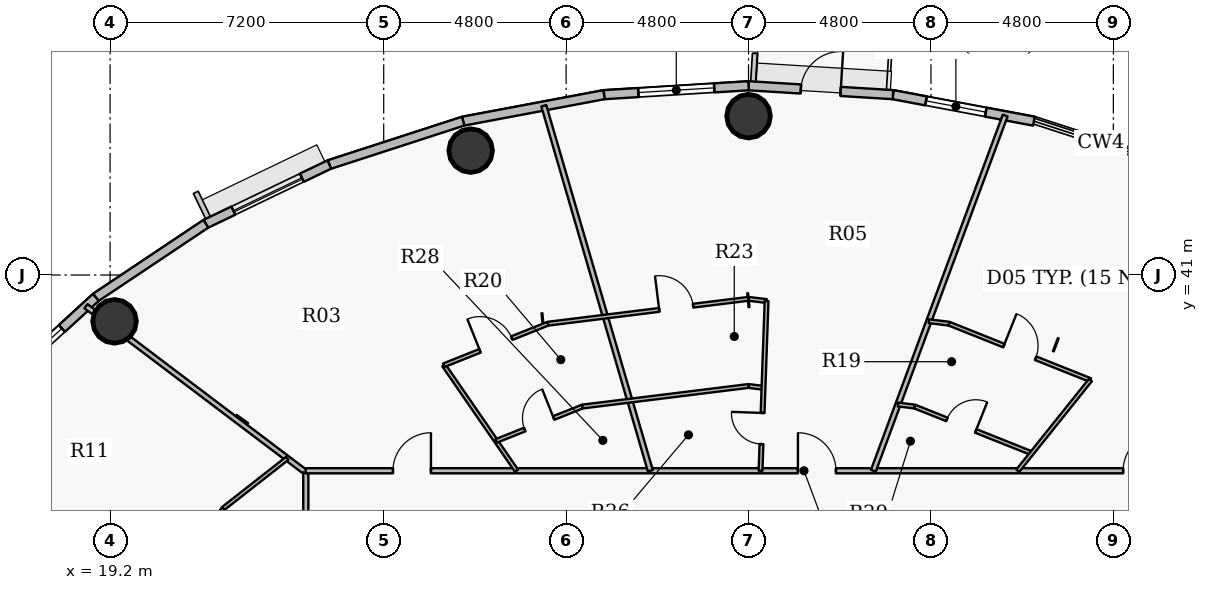
"""IFC4 building model, lengths in metres.
Left out: names, types, materials, properties, quantities, classifications, styles, units other than length and angle.
Written with IfcOpenShell. Run it as: python <this file> out.ifc"""

import sys

from ifc_helpers import new_model, si_unit, direction, frame, frame_2d, origin, origin_2d, place, context, subcontext, project, spatial, rectangle, hollow_circle, extrude, source, transform, mapped, element, fill, save


model = new_model("IFC4")
c1 = context("Model", 3, precision=1e-05, world=origin(), true_north=direction((0.0, 1.0)))
c2 = subcontext(c1, "Body", "Model", "MODEL_VIEW")
j1 = project(units=[si_unit("LENGTHUNIT", "METRE"), si_unit("PLANEANGLEUNIT", "RADIAN")], contexts=[c1])
p1 = place(None, origin())
s1 = spatial("IfcSite", under=j1, at=p1, CompositionType="ELEMENT")
p2 = place(p1, origin())
s2 = spatial("IfcBuilding", under=s1, at=p2, CompositionType="ELEMENT")
p3 = place(p2, frame((0.0, 0.0, 214.05)))
s3 = spatial("IfcBuildingStorey", under=s2, at=p3, CompositionType="ELEMENT", Elevation=214.05)
for number, where, z_axis, x_axis in (
    (1, (36.0, 45.18, 0.0), (0.0, 0.0, 1.0), (1.0, 0.0, 0.0)),
    (2, (28.688, 44.273, 0.0), (0.0, 0.0, 1.0), (1.0, 0.0, 0.0)),
    (3, (19.317, 39.781, 0.0), (0.0, 0.0, 1.0), (1.0, 0.0, 0.0)),
):
    element("IfcColumn", number, at=place(p3, frame(where, z_axis=z_axis, x_axis=x_axis)), inside=s3, PredefinedType="COLUMN", context=c2, shape_type="SweptSolid", body=[
        extrude(hollow_circle(Radius=0.575, WallThickness=0.036, at=origin_2d()), origin(), (0.0, 0.0, 1.0), 3.75),
    ])
p4 = place(p3, frame((39.802, 45.746, 0.0), z_axis=(0.0, 0.0, 1.0), x_axis=(0.982784898575, -0.184753465822, 0.0)))
e4 = element("IfcWall", 4, at=p4, inside=s3, PredefinedType="SOLIDWALL", context=c2, shape_type="SweptSolid", body=[
    extrude(rectangle(XDim=3.773, YDim=0.24, at=frame_2d((1.886, 0.0))), origin(), (0.0, 0.0, 1.0), 3.5),
])
p5 = place(p4, frame((0.884, 0.0, 0.9)))
e5 = element("IfcOpeningElement", 5, at=p5, cuts=e4, PredefinedType="OPENING", context=c2, shape_type="SweptSolid", body=[
    extrude(rectangle(XDim=1.6, YDim=1.75, at=origin_2d()), frame((0.8, 0.13, 0.875), z_axis=(0.0, -1.0, 0.0), x_axis=(1.0, 0.0, 0.0)), (0.0, 0.0, 1.0), 0.26),
])
p6 = place(p3, frame((36.0, 45.98, 0.0), z_axis=(0.0, 0.0, 1.0), x_axis=(0.998108785312, -0.06147237333, 0.0)))
e6 = element("IfcWall", 6, at=p6, inside=s3, PredefinedType="SOLIDWALL", context=c2, shape_type="SweptSolid", body=[
    extrude(rectangle(XDim=3.809, YDim=0.24, at=frame_2d((1.904, 0.0))), origin(), (0.0, 0.0, 1.0), 3.5),
])
p7 = place(p6, frame((1.379, 0.0, 0.0)))
e7 = element("IfcOpeningElement", 7, at=p7, cuts=e6, PredefinedType="OPENING", context=c2, shape_type="SweptSolid", body=[
    extrude(rectangle(XDim=1.05, YDim=2.15, at=origin_2d()), frame((0.525, 0.13, 1.075), z_axis=(0.0, -1.0, 0.0), x_axis=(1.0, 0.0, 0.0)), (0.0, 0.0, 1.0), 0.26),
])
p8 = place(p3, frame((32.198, 45.746, 0.0), z_axis=(0.0, 0.0, 1.0), x_axis=(0.998108785312, 0.06147237333, 0.0)))
e8 = element("IfcWall", 8, at=p8, inside=s3, PredefinedType="SOLIDWALL", context=c2, shape_type="SweptSolid", body=[
    extrude(rectangle(XDim=3.809, YDim=0.24, at=frame_2d((1.904, 0.0))), origin(), (0.0, 0.0, 1.0), 3.5),
])
p9 = place(p8, frame((0.905, 0.0, 0.9)))
e9 = element("IfcOpeningElement", 9, at=p9, cuts=e8, PredefinedType="OPENING", context=c2, shape_type="SweptSolid", body=[
    extrude(rectangle(XDim=2.0, YDim=1.75, at=origin_2d()), frame((1.0, 0.13, 0.875), z_axis=(0.0, -1.0, 0.0), x_axis=(1.0, 0.0, 0.0)), (0.0, 0.0, 1.0), 0.26),
])
p10 = place(p3, frame((28.491, 45.049, 0.0), z_axis=(0.0, 0.0, 1.0), x_axis=(0.982784898575, 0.184753465822, 0.0)))
e10 = element("IfcWall", 10, at=p10, inside=s3, PredefinedType="SOLIDWALL", context=c2, shape_type="SweptSolid", body=[
    extrude(rectangle(XDim=3.773, YDim=0.24, at=frame_2d((1.886, 0.0))), origin(), (0.0, 0.0, 1.0), 3.5),
])
p11 = place(p3, frame((24.969, 43.906, 0.0), z_axis=(0.0, 0.0, 1.0), x_axis=(0.951210789182, 0.308541787354, 0.0)))
e11 = element("IfcWall", 11, at=p11, inside=s3, PredefinedType="SOLIDWALL", context=c2, shape_type="SweptSolid", body=[
    extrude(rectangle(XDim=3.702, YDim=0.24, at=frame_2d((1.851, 0.0))), origin(), (0.0, 0.0, 1.0), 3.5),
])
p12 = place(p3, frame((21.72, 42.348, 0.0), z_axis=(0.0, 0.0, 1.0), x_axis=(0.901598104751, 0.432574684313, 0.0)))
e12 = element("IfcWall", 12, at=p12, inside=s3, PredefinedType="SOLIDWALL", context=c2, shape_type="SweptSolid", body=[
    extrude(rectangle(XDim=3.604, YDim=0.24, at=frame_2d((1.802, 0.0))), origin(), (0.0, 0.0, 1.0), 3.5),
])
p13 = place(p12, frame((0.802, 0.0, 0.9)))
e13 = element("IfcOpeningElement", 13, at=p13, cuts=e12, PredefinedType="OPENING", context=c2, shape_type="SweptSolid", body=[
    extrude(rectangle(XDim=2.0, YDim=1.75, at=origin_2d()), frame((1.0, 0.13, 0.875), z_axis=(0.0, -1.0, 0.0), x_axis=(1.0, 0.0, 0.0)), (0.0, 0.0, 1.0), 0.26),
])
p14 = place(p3, frame((18.824, 40.411, 0.0), z_axis=(0.0, 0.0, 1.0), x_axis=(0.831262496074, 0.555880079352, 0.0)))
e14 = element("IfcWall", 14, at=p14, inside=s3, PredefinedType="SOLIDWALL", context=c2, shape_type="SweptSolid", body=[
    extrude(rectangle(XDim=3.484, YDim=0.24, at=frame_2d((1.742, 0.0))), origin(), (0.0, 0.0, 1.0), 3.5),
])
p15 = place(p3, frame((16.352, 38.145, 0.0), z_axis=(0.0, 0.0, 1.0), x_axis=(0.737123922599, 0.675757591694, 0.0)))
e15 = element("IfcWall", 15, at=p15, inside=s3, PredefinedType="SOLIDWALL", context=c2, shape_type="SweptSolid", body=[
    extrude(rectangle(XDim=3.354, YDim=0.24, at=frame_2d((1.677, 0.0))), origin(), (0.0, 0.0, 1.0), 3.5),
])
p16 = place(p15, frame((0.896, 0.0, 0.9)))
e16 = element("IfcOpeningElement", 16, at=p16, cuts=e15, PredefinedType="OPENING", context=c2, shape_type="SweptSolid", body=[
    extrude(rectangle(XDim=1.25, YDim=1.65, at=origin_2d()), frame((0.625, 0.13, 0.825), z_axis=(0.0, -1.0, 0.0), x_axis=(1.0, 0.0, 0.0)), (0.0, 0.0, 1.0), 0.26),
])
p17 = place(p3, frame((13.997, 34.921, 0.0), z_axis=(0.0, 0.0, 1.0), x_axis=(0.940885654064, -0.338724351023, 0.0)))
e17 = element("IfcWall", 17, at=p17, inside=s3, PredefinedType="PARTITIONING", context=c2, shape_type="SweptSolid", body=[
    extrude(rectangle(XDim=7.082, YDim=0.1, at=frame_2d((3.541, 0.0))), origin(), (0.0, 0.0, 1.0), 2.985),
])
p18 = place(p3, frame((18.565, 40.18, 0.0), z_axis=(0.0, 0.0, 1.0), x_axis=(0.797711861377, -0.603038793295, 0.0)))
e18 = element("IfcWall", 18, at=p18, inside=s3, PredefinedType="PARTITIONING", context=c2, shape_type="SweptSolid", body=[
    extrude(rectangle(XDim=7.252, YDim=0.135, at=frame_2d((3.626, 0.0))), origin(), (0.0, 0.0, 1.0), 2.935),
])
p19 = place(p3, frame((19.756, 31.133, 0.0), z_axis=(0.0, 0.0, 1.0), x_axis=(0.545406924684, 0.83817139447, 0.0)))
e19 = element("IfcWall", 19, at=p19, inside=s3, PredefinedType="PARTITIONING", context=c2, shape_type="SweptSolid", body=[
    extrude(rectangle(XDim=4.448, YDim=0.1, at=frame_2d((2.224, 0.0))), origin(), (0.0, 0.0, 1.0), 2.935),
])
p20 = place(p19, frame((2.583, 0.0, 0.0)))
e20 = element("IfcOpeningElement", 20, at=p20, cuts=e19, PredefinedType="OPENING", context=c2, shape_type="SweptSolid", body=[
    extrude(rectangle(XDim=0.9, YDim=2.1, at=origin_2d()), frame((0.45, 0.06, 1.05), z_axis=(0.0, -1.0, 0.0), x_axis=(1.0, 0.0, 0.0)), (0.0, 0.0, 1.0), 0.12),
])
p21 = place(p3, frame((22.182, 34.861, 0.0), z_axis=(0.0, 0.0, 1.0), x_axis=(0.787401156588, 0.616440928722, 0.0)))
e21 = element("IfcWall", 21, at=p21, inside=s3, PredefinedType="PARTITIONING", context=c2, shape_type="SweptSolid", body=[
    extrude(rectangle(XDim=2.134, YDim=0.1, at=frame_2d((1.067, 0.0))), origin(), (0.0, 0.0, 1.0), 2.935),
])
p22 = place(p3, frame((24.35, 27.95, 0.0), z_axis=(0.0, 0.0, 1.0), x_axis=(0.0, 1.0, 0.0)))
e22 = element("IfcWall", 22, at=p22, inside=s3, PredefinedType="PARTITIONING", context=c2, shape_type="SweptSolid", body=[
    extrude(rectangle(XDim=7.857, YDim=0.135, at=frame_2d((3.929, 0.0))), origin(), (0.0, 0.0, 1.0), 2.935),
])
p23 = place(p22, frame((3.429, 0.0, 0.0)))
e23 = element("IfcOpeningElement", 23, at=p23, cuts=e22, PredefinedType="OPENING", context=c2, shape_type="SweptSolid", body=[
    extrude(rectangle(XDim=1.0, YDim=2.15, at=origin_2d()), frame((0.5, 0.078, 1.075), z_axis=(0.0, -1.0, 0.0), x_axis=(1.0, 0.0, 0.0)), (0.0, 0.0, 1.0), 0.155),
])
p24 = place(p3, frame((24.35, 35.85, 0.0), z_axis=(0.0, 0.0, 1.0), x_axis=(1.0, 0.0, 0.0)))
e24 = element("IfcWall", 24, at=p24, inside=s3, PredefinedType="PARTITIONING", context=c2, shape_type="SweptSolid", body=[
    extrude(rectangle(XDim=26.218, YDim=0.135, at=frame_2d((13.109, 0.0))), origin(), (0.0, 0.0, 1.0), 2.935),
])
p25 = place(p24, frame((21.507, 0.0, 0.0)))
e25 = element("IfcOpeningElement", 25, at=p25, cuts=e24, PredefinedType="OPENING", context=c2, shape_type="SweptSolid", body=[
    extrude(rectangle(XDim=1.0, YDim=2.15, at=origin_2d()), frame((0.5, 0.078, 1.075), z_axis=(0.0, -1.0, 0.0), x_axis=(1.0, 0.0, 0.0)), (0.0, 0.0, 1.0), 0.155),
])
p26 = place(p24, frame((12.95, 0.0, 0.0)))
e26 = element("IfcOpeningElement", 26, at=p26, cuts=e24, PredefinedType="OPENING", context=c2, shape_type="SweptSolid", body=[
    extrude(rectangle(XDim=1.0, YDim=2.15, at=origin_2d()), frame((0.5, 0.078, 1.075), z_axis=(0.0, -1.0, 0.0), x_axis=(1.0, 0.0, 0.0)), (0.0, 0.0, 1.0), 0.155),
])
p27 = place(p24, frame((2.293, 0.0, 0.0)))
e27 = element("IfcOpeningElement", 27, at=p27, cuts=e24, PredefinedType="OPENING", context=c2, shape_type="SweptSolid", body=[
    extrude(rectangle(XDim=1.0, YDim=2.15, at=origin_2d()), frame((0.5, 0.078, 1.075), z_axis=(0.0, -1.0, 0.0), x_axis=(1.0, 0.0, 0.0)), (0.0, 0.0, 1.0), 0.155),
])
p28 = place(p3, frame((27.982, 38.626, 0.0), z_axis=(0.0, 0.0, 1.0), x_axis=(0.56776340906, -0.823191782838, 0.0)))
e28 = element("IfcWall", 28, at=p28, inside=s3, PredefinedType="PARTITIONING", context=c2, shape_type="SweptSolid", body=[
    extrude(rectangle(XDim=3.372, YDim=0.1, at=frame_2d((1.686, 0.0))), origin(), (0.0, 0.0, 1.0), 3.5),
])
p29 = place(p3, frame((27.982, 38.626, 0.0), z_axis=(0.0, 0.0, 1.0), x_axis=(0.928795965169, 0.370591493542, 0.0)))
e29 = element("IfcWall", 29, at=p29, inside=s3, PredefinedType="PARTITIONING", context=c2, shape_type="SweptSolid", body=[
    extrude(rectangle(XDim=2.95, YDim=0.1, at=frame_2d((1.475, 0.0))), origin(), (0.0, 0.0, 1.0), 2.935),
])
p30 = place(p29, frame((1.025, 0.0, 0.0)))
e30 = element("IfcOpeningElement", 30, at=p30, cuts=e29, PredefinedType="OPENING", context=c2, shape_type="SweptSolid", body=[
    extrude(rectangle(XDim=0.9, YDim=2.1, at=origin_2d()), frame((0.45, 0.06, 1.05), z_axis=(0.0, -1.0, 0.0), x_axis=(1.0, 0.0, 0.0)), (0.0, 0.0, 1.0), 0.12),
])
p31 = place(p3, frame((29.356, 36.633, 0.0), z_axis=(0.0, 0.0, 1.0), x_axis=(0.928806968298, 0.370563915731, 0.0)))
e31 = element("IfcWall", 31, at=p31, inside=s3, PredefinedType="PARTITIONING", context=c2, shape_type="SweptSolid", body=[
    extrude(rectangle(XDim=2.444, YDim=0.1, at=frame_2d((1.222, 0.0))), origin(), (0.0, 0.0, 1.0), 2.935),
])
p32 = place(p31, frame((0.812, 0.0, 0.0)))
e32 = element("IfcOpeningElement", 32, at=p32, cuts=e31, PredefinedType="OPENING", context=c2, shape_type="SweptSolid", body=[
    extrude(rectangle(XDim=0.82, YDim=2.1, at=origin_2d()), frame((0.41, 0.06, 1.05), z_axis=(0.0, -1.0, 0.0), x_axis=(1.0, 0.0, 0.0)), (0.0, 0.0, 1.0), 0.12),
])
p33 = place(p3, frame((30.613, 45.453, 0.0), z_axis=(0.0, 0.0, 1.0), x_axis=(0.280222100614, -0.959935192775, 0.0)))
e33 = element("IfcWall", 33, at=p33, inside=s3, PredefinedType="PARTITIONING", context=c2, shape_type="SweptSolid", body=[
    extrude(rectangle(XDim=10.004, YDim=0.135, at=frame_2d((5.002, 0.0))), origin(), (0.0, 0.0, 1.0), 2.985),
])
p34 = place(p3, frame((30.722, 39.719, 0.0), z_axis=(0.0, 0.0, 1.0), x_axis=(0.992398169186, 0.123068573551, 0.0)))
e34 = element("IfcWall", 34, at=p34, inside=s3, PredefinedType="PARTITIONING", context=c2, shape_type="SweptSolid", body=[
    extrude(rectangle(XDim=5.319, YDim=0.1, at=frame_2d((2.659, 0.0))), origin(), (0.0, 0.0, 1.0), 2.935),
])
p35 = place(p34, frame((2.95, 0.0, 0.0)))
e35 = element("IfcOpeningElement", 35, at=p35, cuts=e34, PredefinedType="OPENING", context=c2, shape_type="SweptSolid", body=[
    extrude(rectangle(XDim=0.9, YDim=2.1, at=origin_2d()), frame((0.45, 0.06, 1.05), z_axis=(0.0, -1.0, 0.0), x_axis=(1.0, 0.0, 0.0)), (0.0, 0.0, 1.0), 0.12),
])
p36 = place(p3, frame((31.627, 37.539, 0.0), z_axis=(0.0, 0.0, 1.0), x_axis=(0.992401810072, 0.123039210683, 0.0)))
e36 = element("IfcWall", 36, at=p36, inside=s3, PredefinedType="PARTITIONING", context=c2, shape_type="SweptSolid", body=[
    extrude(rectangle(XDim=4.407, YDim=0.1, at=frame_2d((2.204, 0.0))), origin(), (0.0, 0.0, 1.0), 2.935),
])
p37 = place(p3, frame((36.0, 38.081, 0.0), z_axis=(0.0, 0.0, 1.0), x_axis=(0.99240043869, -0.123050271381, 0.0)))
e37 = element("IfcWall", 37, at=p37, inside=s3, PredefinedType="PARTITIONING", context=c2, shape_type="SweptSolid", body=[
    extrude(rectangle(XDim=0.397, YDim=0.1, at=frame_2d((0.198, 0.0))), origin(), (0.0, 0.0, 1.0), 2.935),
])
p38 = place(p3, frame((36.0, 40.374, 0.0), z_axis=(0.0, 0.0, 1.0), x_axis=(0.992363891793, -0.123344664517, 0.0)))
e38 = element("IfcWall", 38, at=p38, inside=s3, PredefinedType="PARTITIONING", context=c2, shape_type="SweptSolid", body=[
    extrude(rectangle(XDim=0.479, YDim=0.1, at=frame_2d((0.24, 0.0))), origin(), (0.0, 0.0, 1.0), 2.935),
])
p39 = place(p3, frame((36.316, 35.85, 0.0), z_axis=(0.0, 0.0, 1.0), x_axis=(0.035687631784, 0.99936299358, 0.0)))
e39 = element("IfcWall", 39, at=p39, inside=s3, PredefinedType="PARTITIONING", context=c2, shape_type="SweptSolid", body=[
    extrude(rectangle(XDim=4.467, YDim=0.1, at=frame_2d((2.234, 0.0))), origin(), (0.0, 0.0, 1.0), 3.5),
])
p40 = place(p39, frame((0.702, 0.0, 0.0)))
e40 = element("IfcOpeningElement", 40, at=p40, cuts=e39, PredefinedType="OPENING", context=c2, shape_type="SweptSolid", body=[
    extrude(rectangle(XDim=0.82, YDim=2.1, at=origin_2d()), frame((0.41, 0.06, 1.05), z_axis=(0.0, -1.0, 0.0), x_axis=(1.0, 0.0, 0.0)), (0.0, 0.0, 1.0), 0.12),
])
p41 = place(p3, frame((39.285, 35.85, 0.0), z_axis=(0.0, 0.0, 1.0), x_axis=(0.347978689674, 0.937502443481, 0.0)))
e41 = element("IfcWall", 41, at=p41, inside=s3, PredefinedType="PARTITIONING", context=c2, shape_type="SweptSolid", body=[
    extrude(rectangle(XDim=9.969, YDim=0.135, at=frame_2d((4.984, 0.0))), origin(), (0.0, 0.0, 1.0), 2.985),
])
p42 = place(p3, frame((39.932, 37.593, 0.0), z_axis=(0.0, 0.0, 1.0), x_axis=(0.992412401992, -0.122953748919, 0.0)))
e42 = element("IfcWall", 42, at=p42, inside=s3, PredefinedType="PARTITIONING", context=c2, shape_type="SweptSolid", body=[
    extrude(rectangle(XDim=0.445, YDim=0.1, at=frame_2d((0.222, 0.0))), origin(), (0.0, 0.0, 1.0), 3.5),
])
p43 = place(p3, frame((40.373, 37.539, 0.0), z_axis=(0.0, 0.0, 1.0), x_axis=(0.928801257211, -0.370578230071, 0.0)))
e43 = element("IfcWall", 43, at=p43, inside=s3, PredefinedType="PARTITIONING", context=c2, shape_type="SweptSolid", body=[
    extrude(rectangle(XDim=3.316, YDim=0.1, at=frame_2d((1.658, 0.0))), origin(), (0.0, 0.0, 1.0), 2.935),
])
p44 = place(p43, frame((0.91, 0.0, 0.0)))
e44 = element("IfcOpeningElement", 44, at=p44, cuts=e43, PredefinedType="OPENING", context=c2, shape_type="SweptSolid", body=[
    extrude(rectangle(XDim=0.82, YDim=2.1, at=origin_2d()), frame((0.41, 0.06, 1.05), z_axis=(0.0, -1.0, 0.0), x_axis=(1.0, 0.0, 0.0)), (0.0, 0.0, 1.0), 0.12),
])
p45 = place(p3, frame((40.745, 39.785, 0.0), z_axis=(0.0, 0.0, 1.0), x_axis=(0.992431053699, -0.122803109303, 0.0)))
e45 = element("IfcWall", 45, at=p45, inside=s3, PredefinedType="PARTITIONING", context=c2, shape_type="SweptSolid", body=[
    extrude(rectangle(XDim=0.537, YDim=0.1, at=frame_2d((0.269, 0.0))), origin(), (0.0, 0.0, 1.0), 3.5),
])
p46 = place(p3, frame((41.278, 39.719, 0.0), z_axis=(0.0, 0.0, 1.0), x_axis=(0.928808650267, -0.3705596999, 0.0)))
e46 = element("IfcWall", 46, at=p46, inside=s3, PredefinedType="PARTITIONING", context=c2, shape_type="SweptSolid", body=[
    extrude(rectangle(XDim=4.002, YDim=0.1, at=frame_2d((2.001, 0.0))), origin(), (0.0, 0.0, 1.0), 2.935),
])
p47 = place(p46, frame((1.551, 0.0, 0.0)))
e47 = element("IfcOpeningElement", 47, at=p47, cuts=e46, PredefinedType="OPENING", context=c2, shape_type="SweptSolid", body=[
    extrude(rectangle(XDim=0.9, YDim=2.1, at=origin_2d()), frame((0.45, 0.06, 1.05), z_axis=(0.0, -1.0, 0.0), x_axis=(1.0, 0.0, 0.0)), (0.0, 0.0, 1.0), 0.12),
])
p48 = place(p3, frame((43.085, 35.85, 0.0), z_axis=(0.0, 0.0, 1.0), x_axis=(0.62500673738, 0.780619355531, 0.0)))
e48 = element("IfcWall", 48, at=p48, inside=s3, PredefinedType="PARTITIONING", context=c2, shape_type="SweptSolid", body=[
    extrude(rectangle(XDim=3.056, YDim=0.1, at=frame_2d((1.528, 0.0))), origin(), (0.0, 0.0, 1.0), 3.5),
])
m1 = source(origin(), c2, "Body", "SweptSolid", [
    extrude(rectangle(XDim=1.6, YDim=1.75, at=origin_2d()), frame((0.8, 0.03, 0.875), z_axis=(0.0, -1.0, 0.0), x_axis=(1.0, 0.0, 0.0)), (0.0, 0.0, 1.0), 0.06),
])
p49 = place(p5, origin())
e49 = element("IfcWindow", 49, at=p49, inside=s3, PartitioningType="DOUBLE_PANEL_VERTICAL", PredefinedType="WINDOW", context=c2, shape_type="MappedRepresentation", body=[
    mapped(m1, transform((0.0, 0.0, 0.0), x_axis=(1.0, 0.0, 0.0), y_axis=(0.0, 1.0, 0.0), z_axis=(0.0, 0.0, 1.0), scale=1.0)),
])
fill(e5, e49)
m2 = source(origin(), c2, "Body", "SweptSolid", [
    extrude(rectangle(XDim=1.05, YDim=2.15, at=origin_2d()), frame((0.525, 0.025, 1.075), z_axis=(0.0, -1.0, 0.0), x_axis=(1.0, 0.0, 0.0)), (0.0, 0.0, 1.0), 0.05),
])
p50 = place(p7, origin())
e50 = element("IfcDoor", 50, at=p50, inside=s3, OperationType="SINGLE_SWING_RIGHT", PredefinedType="DOOR", context=c2, shape_type="MappedRepresentation", body=[
    mapped(m2, transform((0.0, 0.0, 0.0), x_axis=(1.0, 0.0, 0.0), y_axis=(0.0, 1.0, 0.0), z_axis=(0.0, 0.0, 1.0), scale=1.0)),
])
fill(e7, e50)
m3 = source(origin(), c2, "Body", "SweptSolid", [
    extrude(rectangle(XDim=2.0, YDim=1.75, at=origin_2d()), frame((1.0, 0.03, 0.875), z_axis=(0.0, -1.0, 0.0), x_axis=(1.0, 0.0, 0.0)), (0.0, 0.0, 1.0), 0.06),
])
p51 = place(p9, origin())
e51 = element("IfcWindow", 51, at=p51, inside=s3, PartitioningType="DOUBLE_PANEL_VERTICAL", PredefinedType="WINDOW", context=c2, shape_type="MappedRepresentation", body=[
    mapped(m3, transform((0.0, 0.0, 0.0), x_axis=(1.0, 0.0, 0.0), y_axis=(0.0, 1.0, 0.0), z_axis=(0.0, 0.0, 1.0), scale=1.0)),
])
fill(e9, e51)
p52 = place(p13, origin())
e52 = element("IfcWindow", 52, at=p52, inside=s3, PartitioningType="DOUBLE_PANEL_VERTICAL", PredefinedType="WINDOW", context=c2, shape_type="MappedRepresentation", body=[
    mapped(m3, transform((0.0, 0.0, 0.0), x_axis=(1.0, 0.0, 0.0), y_axis=(0.0, 1.0, 0.0), z_axis=(0.0, 0.0, 1.0), scale=1.0)),
])
fill(e13, e52)
m4 = source(origin(), c2, "Body", "SweptSolid", [
    extrude(rectangle(XDim=1.25, YDim=1.65, at=origin_2d()), frame((0.625, 0.03, 0.825), z_axis=(0.0, -1.0, 0.0), x_axis=(1.0, 0.0, 0.0)), (0.0, 0.0, 1.0), 0.06),
])
p53 = place(p16, origin())
e53 = element("IfcWindow", 53, at=p53, inside=s3, PartitioningType="SINGLE_PANEL", PredefinedType="WINDOW", context=c2, shape_type="MappedRepresentation", body=[
    mapped(m4, transform((0.0, 0.0, 0.0), x_axis=(1.0, 0.0, 0.0), y_axis=(0.0, 1.0, 0.0), z_axis=(0.0, 0.0, 1.0), scale=1.0)),
])
fill(e16, e53)
m5 = source(origin(), c2, "Body", "SweptSolid", [
    extrude(rectangle(XDim=1.0, YDim=2.15, at=origin_2d()), frame((0.5, 0.025, 1.075), z_axis=(0.0, -1.0, 0.0), x_axis=(1.0, 0.0, 0.0)), (0.0, 0.0, 1.0), 0.05),
])
p54 = place(p25, origin())
e54 = element("IfcDoor", 54, at=p54, inside=s3, OperationType="SINGLE_SWING_RIGHT", PredefinedType="DOOR", context=c2, shape_type="MappedRepresentation", body=[
    mapped(m5, transform((0.0, 0.0, 0.0), x_axis=(1.0, 0.0, 0.0), y_axis=(0.0, 1.0, 0.0), z_axis=(0.0, 0.0, 1.0), scale=1.0)),
])
fill(e25, e54)
m6 = source(origin(), c2, "Body", "SweptSolid", [
    extrude(rectangle(XDim=0.9, YDim=2.1, at=origin_2d()), frame((0.45, 0.025, 1.05), z_axis=(0.0, -1.0, 0.0), x_axis=(1.0, 0.0, 0.0)), (0.0, 0.0, 1.0), 0.05),
])
p55 = place(p47, origin())
e55 = element("IfcDoor", 55, at=p55, inside=s3, OperationType="SINGLE_SWING_LEFT", PredefinedType="DOOR", context=c2, shape_type="MappedRepresentation", body=[
    mapped(m6, transform((0.0, 0.0, 0.0), x_axis=(1.0, 0.0, 0.0), y_axis=(0.0, 1.0, 0.0), z_axis=(0.0, 0.0, 1.0), scale=1.0)),
])
fill(e47, e55)
m7 = source(origin(), c2, "Body", "SweptSolid", [
    extrude(rectangle(XDim=0.82, YDim=2.1, at=origin_2d()), frame((0.41, 0.025, 1.05), z_axis=(0.0, -1.0, 0.0), x_axis=(1.0, 0.0, 0.0)), (0.0, 0.0, 1.0), 0.05),
])
p56 = place(p44, origin())
e56 = element("IfcDoor", 56, at=p56, inside=s3, OperationType="SINGLE_SWING_RIGHT", PredefinedType="DOOR", context=c2, shape_type="MappedRepresentation", body=[
    mapped(m7, transform((0.0, 0.0, 0.0), x_axis=(1.0, 0.0, 0.0), y_axis=(0.0, 1.0, 0.0), z_axis=(0.0, 0.0, 1.0), scale=1.0)),
])
fill(e44, e56)
p57 = place(p26, origin())
e57 = element("IfcDoor", 57, at=p57, inside=s3, OperationType="SINGLE_SWING_LEFT", PredefinedType="DOOR", context=c2, shape_type="MappedRepresentation", body=[
    mapped(m5, transform((0.0, 0.0, 0.0), x_axis=(1.0, 0.0, 0.0), y_axis=(0.0, 1.0, 0.0), z_axis=(0.0, 0.0, 1.0), scale=1.0)),
])
fill(e26, e57)
p58 = place(p40, origin())
e58 = element("IfcDoor", 58, at=p58, inside=s3, OperationType="SINGLE_SWING_RIGHT", PredefinedType="DOOR", context=c2, shape_type="MappedRepresentation", body=[
    mapped(m7, transform((0.0, 0.0, 0.0), x_axis=(1.0, 0.0, 0.0), y_axis=(0.0, 1.0, 0.0), z_axis=(0.0, 0.0, 1.0), scale=1.0)),
])
fill(e40, e58)
p59 = place(p35, origin())
e59 = element("IfcDoor", 59, at=p59, inside=s3, OperationType="SINGLE_SWING_LEFT", PredefinedType="DOOR", context=c2, shape_type="MappedRepresentation", body=[
    mapped(m6, transform((0.0, 0.0, 0.0), x_axis=(1.0, 0.0, 0.0), y_axis=(0.0, 1.0, 0.0), z_axis=(0.0, 0.0, 1.0), scale=1.0)),
])
fill(e35, e59)
p60 = place(p27, origin())
e60 = element("IfcDoor", 60, at=p60, inside=s3, OperationType="SINGLE_SWING_RIGHT", PredefinedType="DOOR", context=c2, shape_type="MappedRepresentation", body=[
    mapped(m5, transform((0.0, 0.0, 0.0), x_axis=(1.0, 0.0, 0.0), y_axis=(0.0, 1.0, 0.0), z_axis=(0.0, 0.0, 1.0), scale=1.0)),
])
fill(e27, e60)
p61 = place(p30, origin())
e61 = element("IfcDoor", 61, at=p61, inside=s3, OperationType="SINGLE_SWING_LEFT", PredefinedType="DOOR", context=c2, shape_type="MappedRepresentation", body=[
    mapped(m6, transform((0.0, 0.0, 0.0), x_axis=(1.0, 0.0, 0.0), y_axis=(0.0, 1.0, 0.0), z_axis=(0.0, 0.0, 1.0), scale=1.0)),
])
fill(e30, e61)
p62 = place(p32, origin())
e62 = element("IfcDoor", 62, at=p62, inside=s3, OperationType="SINGLE_SWING_RIGHT", PredefinedType="DOOR", context=c2, shape_type="MappedRepresentation", body=[
    mapped(m7, transform((0.0, 0.0, 0.0), x_axis=(1.0, 0.0, 0.0), y_axis=(0.0, 1.0, 0.0), z_axis=(0.0, 0.0, 1.0), scale=1.0)),
])
fill(e32, e62)
save(model, sys.argv[1])
